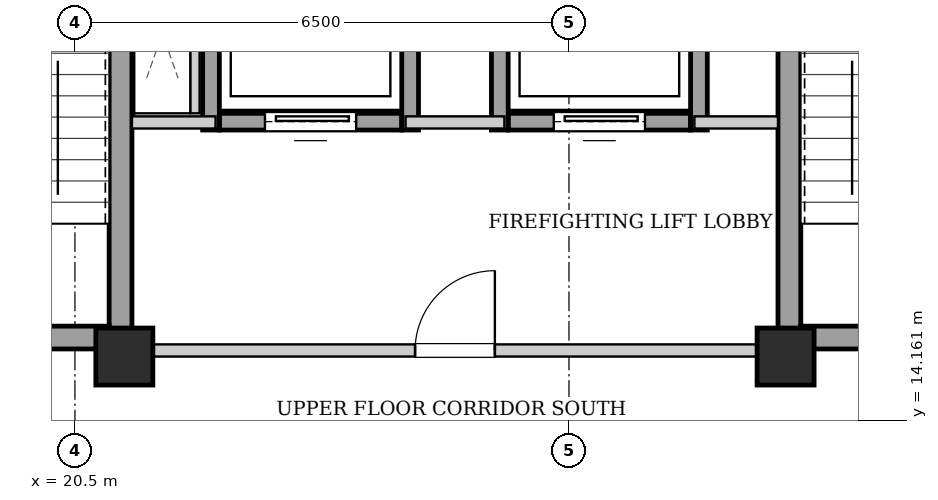
"""IFC4 building model, lengths in metres.
Left out: names, types, materials, properties, quantities, classifications, styles, units other than length and angle.
Written with IfcOpenShell. Run it as: python <this file> out.ifc"""

import sys

from ifc_helpers import new_model, si_unit, direction, frame, frame_2d, origin, origin_2d, place, context, subcontext, project, spatial, rectangle, extrude, element, fill, save


model = new_model("IFC4")
c1 = context("Model", 3, precision=1e-05, world=origin(), true_north=direction((0.0, 1.0)))
c2 = subcontext(c1, "Body", "Model", "MODEL_VIEW")
j1 = project(units=[si_unit("LENGTHUNIT", "METRE"), si_unit("PLANEANGLEUNIT", "RADIAN")], contexts=[c1])
p1 = place(None, origin())
s1 = spatial("IfcSite", under=j1, at=p1, CompositionType="ELEMENT")
p2 = place(p1, origin())
s2 = spatial("IfcBuilding", under=s1, at=p2, CompositionType="ELEMENT")
p3 = place(p2, frame((0.0, 0.0, 227.5)))
s3 = spatial("IfcBuildingStorey", under=s2, at=p3, CompositionType="ELEMENT", Elevation=227.5)
for number, where, z_axis, x_axis in (
    (1, (21.15, 15.0, 0.0), (0.0, 0.0, 1.0), (1.0, 0.0, 0.0)),
    (2, (29.85, 15.0, 0.0), (0.0, 0.0, 1.0), (1.0, 0.0, 0.0)),
):
    element("IfcColumn", number, at=place(p3, frame(where, z_axis=z_axis, x_axis=x_axis)), inside=s3, PredefinedType="COLUMN", context=c2, shape_type="SweptSolid", body=[
        extrude(rectangle(XDim=0.75, YDim=0.75, at=origin_2d()), origin(), (0.0, 0.0, 1.0), 3.4),
    ])
p4 = place(p3, frame((21.1, 15.1, 0.0), z_axis=(0.0, 0.0, 1.0), x_axis=(0.0, 1.0, 0.0)))
e3 = element("IfcWall", 3, at=p4, inside=s3, PredefinedType="SHEAR", context=c2, shape_type="SweptSolid", body=[
    extrude(rectangle(XDim=9.0, YDim=0.3, at=frame_2d((4.5, 0.0))), origin(), (0.0, 0.0, 1.0), 3.14),
])
p5 = place(p3, frame((18.1, 15.25, 0.0), z_axis=(0.0, 0.0, 1.0), x_axis=(1.0, 0.0, 0.0)))
e4 = element("IfcWall", 4, at=p5, inside=s3, PredefinedType="SHEAR", context=c2, shape_type="SweptSolid", body=[
    extrude(rectangle(XDim=2.85, YDim=0.3, at=frame_2d((1.425, 0.0))), origin(), (0.0, 0.0, 1.0), 3.14),
])
p6 = place(p5, frame((0.86, 0.0, 0.0)))
e5 = element("IfcOpeningElement", 5, at=p6, cuts=e4, PredefinedType="OPENING", context=c2, shape_type="SweptSolid", body=[
    extrude(rectangle(XDim=1.1, YDim=2.05, at=frame_2d((0.55, 1.025))), frame((0.0, 0.16, 0.0), z_axis=(0.0, -1.0, 0.0), x_axis=(1.0, 0.0, 0.0)), (0.0, 0.0, 1.0), 0.32),
])
p7 = place(p3, frame((29.9, 15.1, 0.0), z_axis=(0.0, 0.0, 1.0), x_axis=(0.0, 1.0, 0.0)))
e6 = element("IfcWall", 6, at=p7, inside=s3, PredefinedType="SHEAR", context=c2, shape_type="SweptSolid", body=[
    extrude(rectangle(XDim=9.0, YDim=0.3, at=frame_2d((4.5, 0.0))), origin(), (0.0, 0.0, 1.0), 3.14),
])
p8 = place(p3, frame((30.05, 15.25, 0.0), z_axis=(0.0, 0.0, 1.0), x_axis=(1.0, 0.0, 0.0)))
e7 = element("IfcWall", 7, at=p8, inside=s3, PredefinedType="SHEAR", context=c2, shape_type="SweptSolid", body=[
    extrude(rectangle(XDim=2.85, YDim=0.3, at=frame_2d((1.425, 0.0))), origin(), (0.0, 0.0, 1.0), 3.14),
])
p9 = place(p8, frame((0.86, 0.0, 0.0)))
e8 = element("IfcOpeningElement", 8, at=p9, cuts=e7, PredefinedType="OPENING", context=c2, shape_type="SweptSolid", body=[
    extrude(rectangle(XDim=1.1, YDim=2.05, at=frame_2d((0.55, 1.025))), frame((0.0, 0.16, 0.0), z_axis=(0.0, -1.0, 0.0), x_axis=(1.0, 0.0, 0.0)), (0.0, 0.0, 1.0), 0.32),
])
p10 = place(p3, frame((22.4, 18.09, 0.0), z_axis=(0.0, 0.0, 1.0), x_axis=(1.0, 0.0, 0.0)))
e9 = element("IfcWall", 9, at=p10, inside=s3, PredefinedType="SHEAR", context=c2, shape_type="SweptSolid", body=[
    extrude(rectangle(XDim=2.4, YDim=0.22, at=frame_2d((1.2, 0.0))), origin(), (0.0, 0.0, 1.0), 3.14),
])
p11 = place(p10, frame((0.6, 0.0, 0.0)))
e10 = element("IfcOpeningElement", 10, at=p11, cuts=e9, PredefinedType="OPENING", context=c2, shape_type="SweptSolid", body=[
    extrude(rectangle(XDim=1.2, YDim=2.15, at=frame_2d((0.6, 1.075))), frame((0.0, 0.12, 0.0), z_axis=(0.0, -1.0, 0.0), x_axis=(1.0, 0.0, 0.0)), (0.0, 0.0, 1.0), 0.24),
])
for number, where, z_axis, x_axis in (
    (11, (22.29, 17.98, 0.0), (0.0, 0.0, 1.0), (0.0, 1.0, 0.0)),
    (12, (24.91, 17.98, 0.0), (0.0, 0.0, 1.0), (0.0, 1.0, 0.0)),
):
    element("IfcWall", number, at=place(p3, frame(where, z_axis=z_axis, x_axis=x_axis)), inside=s3, PredefinedType="SHEAR", context=c2, shape_type="SweptSolid", body=[
        extrude(rectangle(XDim=2.54, YDim=0.22, at=frame_2d((1.27, 0.0))), origin(), (0.0, 0.0, 1.0), 3.14),
    ])
p12 = place(p3, frame((26.2, 18.09, 0.0), z_axis=(0.0, 0.0, 1.0), x_axis=(1.0, 0.0, 0.0)))
e13 = element("IfcWall", 13, at=p12, inside=s3, PredefinedType="SHEAR", context=c2, shape_type="SweptSolid", body=[
    extrude(rectangle(XDim=2.4, YDim=0.22, at=frame_2d((1.2, 0.0))), origin(), (0.0, 0.0, 1.0), 3.14),
])
p13 = place(p12, frame((0.6, 0.0, 0.0)))
e14 = element("IfcOpeningElement", 14, at=p13, cuts=e13, PredefinedType="OPENING", context=c2, shape_type="SweptSolid", body=[
    extrude(rectangle(XDim=1.2, YDim=2.15, at=frame_2d((0.6, 1.075))), frame((0.0, 0.12, 0.0), z_axis=(0.0, -1.0, 0.0), x_axis=(1.0, 0.0, 0.0)), (0.0, 0.0, 1.0), 0.24),
])
for number, where, z_axis, x_axis in (
    (15, (26.09, 17.98, 0.0), (0.0, 0.0, 1.0), (0.0, 1.0, 0.0)),
    (16, (28.71, 17.98, 0.0), (0.0, 0.0, 1.0), (0.0, 1.0, 0.0)),
):
    element("IfcWall", number, at=place(p3, frame(where, z_axis=z_axis, x_axis=x_axis)), inside=s3, PredefinedType="SHEAR", context=c2, shape_type="SweptSolid", body=[
        extrude(rectangle(XDim=2.54, YDim=0.22, at=frame_2d((1.27, 0.0))), origin(), (0.0, 0.0, 1.0), 3.14),
    ])
p14 = place(p3, frame((21.25, 15.08, 0.0), z_axis=(0.0, 0.0, 1.0), x_axis=(1.0, 0.0, 0.0)))
e17 = element("IfcWall", 17, at=p14, inside=s3, PredefinedType="PARTITIONING", context=c2, shape_type="SweptSolid", body=[
    extrude(rectangle(XDim=8.5, YDim=0.16, at=frame_2d((4.25, 0.0))), origin(), (0.0, 0.0, 1.0), 2.668),
])
p15 = place(p14, frame((3.725, 0.0, 0.0)))
e18 = element("IfcOpeningElement", 18, at=p15, cuts=e17, PredefinedType="OPENING", context=c2, shape_type="SweptSolid", body=[
    extrude(rectangle(XDim=1.05, YDim=2.05, at=frame_2d((0.525, 1.025))), frame((0.0, 0.09, 0.0), z_axis=(0.0, -1.0, 0.0), x_axis=(1.0, 0.0, 0.0)), (0.0, 0.0, 1.0), 0.18),
])
p16 = place(p3, frame((21.25, 18.08, 0.0), z_axis=(0.0, 0.0, 1.0), x_axis=(1.0, 0.0, 0.0)))
e19 = element("IfcWall", 19, at=p16, inside=s3, PredefinedType="PARTITIONING", context=c2, shape_type="SweptSolid", body=[
    extrude(rectangle(XDim=1.1, YDim=0.16, at=frame_2d((0.55, 0.0))), origin(), (0.0, 0.0, 1.0), 3.14),
])
p17 = place(p3, frame((24.85, 18.08, 0.0), z_axis=(0.0, 0.0, 1.0), x_axis=(1.0, 0.0, 0.0)))
e20 = element("IfcWall", 20, at=p17, inside=s3, PredefinedType="PARTITIONING", context=c2, shape_type="SweptSolid", body=[
    extrude(rectangle(XDim=1.3, YDim=0.16, at=frame_2d((0.65, 0.0))), origin(), (0.0, 0.0, 1.0), 3.14),
])
p18 = place(p3, frame((28.65, 18.08, 0.0), z_axis=(0.0, 0.0, 1.0), x_axis=(1.0, 0.0, 0.0)))
e21 = element("IfcWall", 21, at=p18, inside=s3, PredefinedType="PARTITIONING", context=c2, shape_type="SweptSolid", body=[
    extrude(rectangle(XDim=1.1, YDim=0.16, at=frame_2d((0.55, 0.0))), origin(), (0.0, 0.0, 1.0), 3.14),
])
p19 = place(p3, frame((22.08, 18.2, 0.0), z_axis=(0.0, 0.0, 1.0), x_axis=(0.0, 1.0, 0.0)))
e22 = element("IfcWall", 22, at=p19, inside=s3, PredefinedType="PARTITIONING", context=c2, shape_type="SweptSolid", body=[
    extrude(rectangle(XDim=2.12, YDim=0.12, at=frame_2d((1.06, 0.0))), origin(), (0.0, 0.0, 1.0), 3.14),
])
p20 = place(p11, origin())
e23 = element("IfcDoor", 23, at=p20, inside=s3, OperationType="SLIDING_TO_LEFT", PredefinedType="DOOR", context=c2, shape_type="SweptSolid", body=[
    extrude(rectangle(XDim=1.2, YDim=2.15, at=frame_2d((0.6, 1.075))), frame((0.0, 0.025, 0.0), z_axis=(0.0, -1.0, 0.0), x_axis=(1.0, 0.0, 0.0)), (0.0, 0.0, 1.0), 0.05),
])
fill(e10, e23)
p21 = place(p13, origin())
e24 = element("IfcDoor", 24, at=p21, inside=s3, OperationType="SLIDING_TO_LEFT", PredefinedType="DOOR", context=c2, shape_type="SweptSolid", body=[
    extrude(rectangle(XDim=1.2, YDim=2.15, at=frame_2d((0.6, 1.075))), frame((0.0, 0.025, 0.0), z_axis=(0.0, -1.0, 0.0), x_axis=(1.0, 0.0, 0.0)), (0.0, 0.0, 1.0), 0.05),
])
fill(e14, e24)
p22 = place(p15, origin())
e25 = element("IfcDoor", 25, at=p22, inside=s3, OperationType="SINGLE_SWING_RIGHT", PredefinedType="DOOR", context=c2, shape_type="SweptSolid", body=[
    extrude(rectangle(XDim=1.05, YDim=2.05, at=frame_2d((0.525, 1.025))), frame((0.0, 0.025, 0.0), z_axis=(0.0, -1.0, 0.0), x_axis=(1.0, 0.0, 0.0)), (0.0, 0.0, 1.0), 0.05),
])
fill(e18, e25)
save(model, sys.argv[1])
